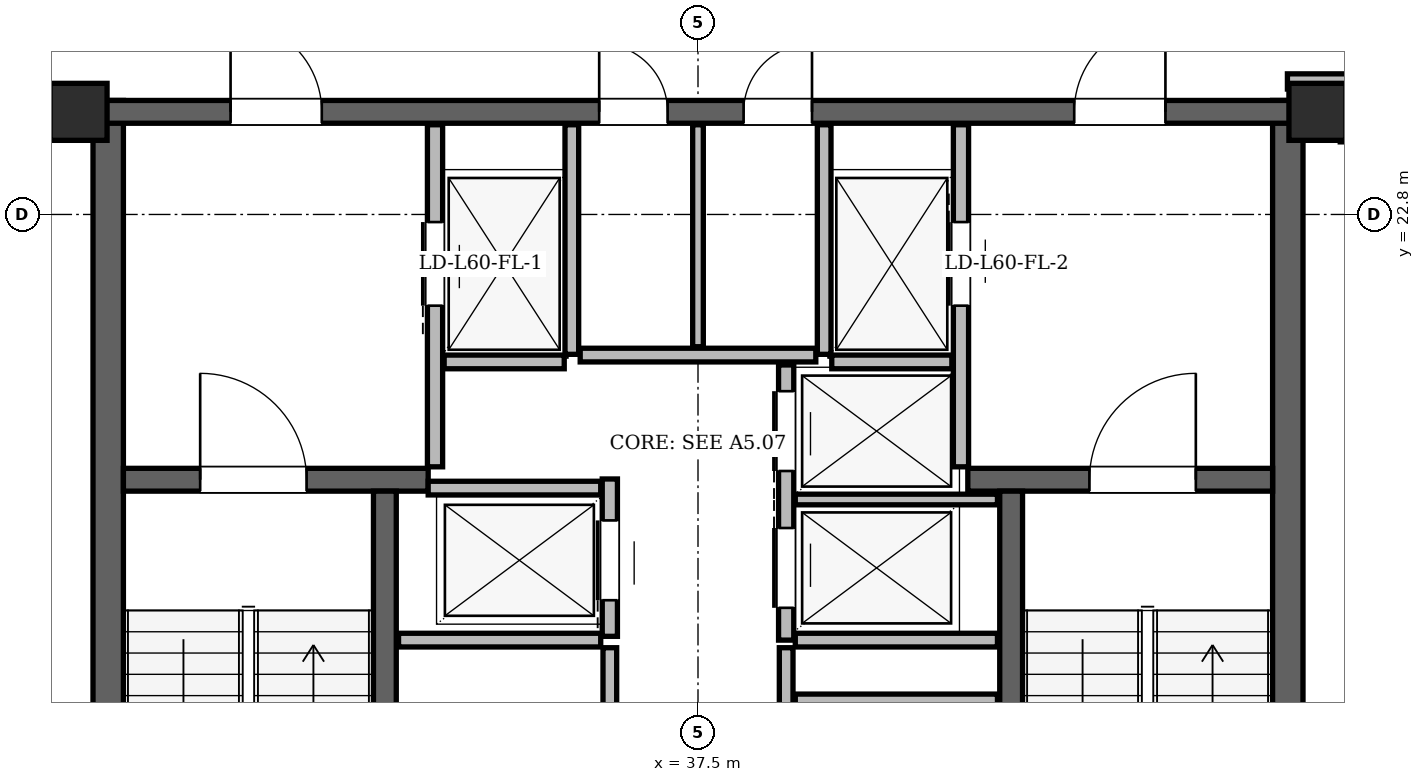
"""IFC4 building model, lengths in metres.
Left out: names, types, materials, properties, quantities, classifications, styles, units other than length and angle.
Written with IfcOpenShell. Run it as: python <this file> out.ifc"""

import sys

from ifc_helpers import new_model, si_unit, direction, frame, frame_2d, origin, origin_2d, place, context, subcontext, project, spatial, rectangle, hollow_rectangle, extrude, element, fill, save


model = new_model("IFC4")
c1 = context("Model", 3, precision=1e-05, world=origin(), true_north=direction((0.0, 1.0)))
c2 = subcontext(c1, "Body", "Model", "MODEL_VIEW")
j1 = project(units=[si_unit("LENGTHUNIT", "METRE"), si_unit("PLANEANGLEUNIT", "RADIAN")], contexts=[c1])
p1 = place(None, origin())
s1 = spatial("IfcSite", under=j1, at=p1, CompositionType="ELEMENT")
p2 = place(p1, origin())
s2 = spatial("IfcBuilding", under=s1, at=p2, CompositionType="ELEMENT")
p3 = place(p2, frame((0.0, 0.0, 227.1)))
s3 = spatial("IfcBuildingStorey", under=s2, at=p3, CompositionType="ELEMENT", Elevation=227.1)
for number, where, z_axis, x_axis in (
    (1, (45.65, 24.15, 0.0), (0.0, 0.0, 1.0), (1.0, 0.0, 0.0)),
    (2, (29.35, 24.15, 0.0), (0.0, 0.0, 1.0), (1.0, 0.0, 0.0)),
):
    element("IfcColumn", number, at=place(p3, frame(where, z_axis=z_axis, x_axis=x_axis)), inside=s3, PredefinedType="COLUMN", context=c2, shape_type="SweptSolid", body=[
        extrude(hollow_rectangle(XDim=0.75, YDim=0.75, WallThickness=0.06, at=origin_2d()), origin(), (0.0, 0.0, 1.0), 3.6),
    ])
for number, where, z_axis, x_axis in (
    (3, (29.74, 11.0, 0.0), (0.0, 0.0, 1.0), (0.0, 1.0, 0.0)),
    (4, (45.26, 11.0, 0.0), (0.0, 0.0, 1.0), (0.0, 1.0, 0.0)),
):
    element("IfcWall", number, at=place(p3, frame(where, z_axis=z_axis, x_axis=x_axis)), inside=s3, PredefinedType="SHEAR", context=c2, shape_type="SweptSolid", body=[
        extrude(rectangle(XDim=13.3, YDim=0.4, at=frame_2d((6.65, 0.0))), origin(), (0.0, 0.0, 1.0), 3.38),
    ])
p4 = place(p3, frame((29.65, 24.15, 0.0), z_axis=(0.0, 0.0, 1.0), x_axis=(1.0, 0.0, 0.0)))
e5 = element("IfcWall", 5, at=p4, inside=s3, PredefinedType="SHEAR", context=c2, shape_type="SweptSolid", body=[
    extrude(rectangle(XDim=15.7, YDim=0.3, at=frame_2d((7.85, 0.0))), origin(), (0.0, 0.0, 1.0), 3.38),
])
p5 = place(p4, frame((1.7, 0.0, 0.0)))
e6 = element("IfcOpeningElement", 6, at=p5, cuts=e5, PredefinedType="OPENING", context=c2, shape_type="SweptSolid", body=[
    extrude(rectangle(XDim=1.2, YDim=2.2, at=frame_2d((0.6, 1.1))), frame((0.0, 0.15, 0.0), z_axis=(0.0, -1.0, 0.0), x_axis=(1.0, 0.0, 0.0)), (0.0, 0.0, 1.0), 0.3),
])
p6 = place(p4, frame((12.8, 0.0, 0.0)))
e7 = element("IfcOpeningElement", 7, at=p6, cuts=e5, PredefinedType="OPENING", context=c2, shape_type="SweptSolid", body=[
    extrude(rectangle(XDim=1.2, YDim=2.2, at=frame_2d((0.6, 1.1))), frame((0.0, 0.15, 0.0), z_axis=(0.0, -1.0, 0.0), x_axis=(1.0, 0.0, 0.0)), (0.0, 0.0, 1.0), 0.3),
])
p7 = place(p4, frame((6.55, 0.0, 0.0)))
e8 = element("IfcOpeningElement", 8, at=p7, cuts=e5, PredefinedType="OPENING", context=c2, shape_type="SweptSolid", body=[
    extrude(rectangle(XDim=0.9, YDim=2.05, at=frame_2d((0.45, 1.025))), frame((0.0, 0.15, 0.0), z_axis=(0.0, -1.0, 0.0), x_axis=(1.0, 0.0, 0.0)), (0.0, 0.0, 1.0), 0.3),
])
p8 = place(p4, frame((8.45, 0.0, 0.0)))
e9 = element("IfcOpeningElement", 9, at=p8, cuts=e5, PredefinedType="OPENING", context=c2, shape_type="SweptSolid", body=[
    extrude(rectangle(XDim=0.9, YDim=2.05, at=frame_2d((0.45, 1.025))), frame((0.0, 0.15, 0.0), z_axis=(0.0, -1.0, 0.0), x_axis=(1.0, 0.0, 0.0)), (0.0, 0.0, 1.0), 0.3),
])
p9 = place(p3, frame((29.94, 19.31, 0.0), z_axis=(0.0, 0.0, 1.0), x_axis=(1.0, 0.0, 0.0)))
e10 = element("IfcWall", 10, at=p9, inside=s3, PredefinedType="SHEAR", context=c2, shape_type="SweptSolid", body=[
    extrude(rectangle(XDim=4.01, YDim=0.3, at=frame_2d((2.005, 0.0))), origin(), (0.0, 0.0, 1.0), 3.38),
])
p10 = place(p9, frame((1.01, 0.0, 0.0)))
e11 = element("IfcOpeningElement", 11, at=p10, cuts=e10, PredefinedType="OPENING", context=c2, shape_type="SweptSolid", body=[
    extrude(rectangle(XDim=1.4, YDim=2.2, at=frame_2d((0.7, 1.1))), frame((0.0, 0.15, 0.0), z_axis=(0.0, -1.0, 0.0), x_axis=(1.0, 0.0, 0.0)), (0.0, 0.0, 1.0), 0.3),
])
p11 = place(p3, frame((41.05, 19.31, 0.0), z_axis=(0.0, 0.0, 1.0), x_axis=(1.0, 0.0, 0.0)))
e12 = element("IfcWall", 12, at=p11, inside=s3, PredefinedType="SHEAR", context=c2, shape_type="SweptSolid", body=[
    extrude(rectangle(XDim=4.01, YDim=0.3, at=frame_2d((2.005, 0.0))), origin(), (0.0, 0.0, 1.0), 3.38),
])
p12 = place(p11, frame((1.6, 0.0, 0.0)))
e13 = element("IfcOpeningElement", 13, at=p12, cuts=e12, PredefinedType="OPENING", context=c2, shape_type="SweptSolid", body=[
    extrude(rectangle(XDim=1.4, YDim=2.2, at=frame_2d((0.7, 1.1))), frame((0.0, 0.15, 0.0), z_axis=(0.0, -1.0, 0.0), x_axis=(1.0, 0.0, 0.0)), (0.0, 0.0, 1.0), 0.3),
])
for number, where, z_axis, x_axis in (
    (14, (33.38, 11.54, 0.0), (0.0, 0.0, 1.0), (0.0, 1.0, 0.0)),
    (15, (41.62, 11.54, 0.0), (0.0, 0.0, 1.0), (0.0, 1.0, 0.0)),
):
    element("IfcWall", number, at=place(p3, frame(where, z_axis=z_axis, x_axis=x_axis)), inside=s3, PredefinedType="SHEAR", context=c2, shape_type="SweptSolid", body=[
        extrude(rectangle(XDim=7.62, YDim=0.3, at=frame_2d((3.81, 0.0))), origin(), (0.0, 0.0, 1.0), 3.38),
    ])
p13 = place(p3, frame((34.344, 43.135, 0.0), z_axis=(0.0, 0.0, 1.0), x_axis=(-0.499998927115, -0.866026023214, 0.0)))
e16 = element("IfcWall", 16, at=p13, inside=s3, PredefinedType="SOLIDWALL", context=c2, shape_type="SweptSolid", body=[
    extrude(rectangle(XDim=36.742, YDim=0.29, at=frame_2d((18.371, 0.0))), origin(), (0.0, 0.0, 1.0), 2.677),
])
p14 = place(p13, frame((8.664, 0.0, 0.0)))
e17 = element("IfcOpeningElement", 17, at=p14, cuts=e16, PredefinedType="OPENING", context=c2, shape_type="SweptSolid", body=[
    extrude(rectangle(XDim=1.5, YDim=2.2, at=frame_2d((0.75, 1.1))), frame((0.0, 0.145, 0.0), z_axis=(0.0, -1.0, 0.0), x_axis=(1.0, 0.0, 0.0)), (0.0, 0.0, 1.0), 0.29),
])
p15 = place(p13, frame((28.452, 0.0, 0.0)))
e18 = element("IfcOpeningElement", 18, at=p15, cuts=e16, PredefinedType="OPENING", context=c2, shape_type="SweptSolid", body=[
    extrude(rectangle(XDim=1.5, YDim=2.2, at=frame_2d((0.75, 1.1))), frame((0.0, 0.145, 0.0), z_axis=(0.0, -1.0, 0.0), x_axis=(1.0, 0.0, 0.0)), (0.0, 0.0, 1.0), 0.29),
])
p16 = place(p13, frame((22.282, 0.0, 0.85)))
e19 = element("IfcOpeningElement", 19, at=p16, cuts=e16, PredefinedType="OPENING", context=c2, shape_type="SweptSolid", body=[
    extrude(rectangle(XDim=2.4, YDim=1.717, at=frame_2d((1.2, 0.858))), frame((0.0, 0.145, 0.0), z_axis=(0.0, -1.0, 0.0), x_axis=(1.0, 0.0, 0.0)), (0.0, 0.0, 1.0), 0.29),
])
p17 = place(p13, frame((33.369, 0.0, 0.85)))
e20 = element("IfcOpeningElement", 20, at=p17, cuts=e16, PredefinedType="OPENING", context=c2, shape_type="SweptSolid", body=[
    extrude(rectangle(XDim=2.2, YDim=1.717, at=frame_2d((1.1, 0.858))), frame((0.0, 0.145, 0.0), z_axis=(0.0, -1.0, 0.0), x_axis=(1.0, 0.0, 0.0)), (0.0, 0.0, 1.0), 0.29),
])
p18 = place(p13, frame((11.999, 0.0, 0.85)))
e21 = element("IfcOpeningElement", 21, at=p18, cuts=e16, PredefinedType="OPENING", context=c2, shape_type="SweptSolid", body=[
    extrude(rectangle(XDim=2.4, YDim=1.717, at=frame_2d((1.2, 0.858))), frame((0.0, 0.145, 0.0), z_axis=(0.0, -1.0, 0.0), x_axis=(1.0, 0.0, 0.0)), (0.0, 0.0, 1.0), 0.29),
])
p19 = place(p13, frame((16.783, 0.0, 0.85)))
e22 = element("IfcOpeningElement", 22, at=p19, cuts=e16, PredefinedType="OPENING", context=c2, shape_type="SweptSolid", body=[
    extrude(rectangle(XDim=1.8, YDim=1.717, at=frame_2d((0.9, 0.858))), frame((0.0, 0.145, 0.0), z_axis=(0.0, -1.0, 0.0), x_axis=(1.0, 0.0, 0.0)), (0.0, 0.0, 1.0), 0.29),
])
p20 = place(p13, frame((3.365, 0.0, 0.85)))
e23 = element("IfcOpeningElement", 23, at=p20, cuts=e16, PredefinedType="OPENING", context=c2, shape_type="SweptSolid", body=[
    extrude(rectangle(XDim=1.2, YDim=1.48, at=frame_2d((0.6, 0.74))), frame((0.0, 0.145, 0.0), z_axis=(0.0, -1.0, 0.0), x_axis=(1.0, 0.0, 0.0)), (0.0, 0.0, 1.0), 0.29),
])
p21 = place(p13, frame((6.797, 0.0, 0.85)))
e24 = element("IfcOpeningElement", 24, at=p21, cuts=e16, PredefinedType="OPENING", context=c2, shape_type="SweptSolid", body=[
    extrude(rectangle(XDim=1.2, YDim=1.48, at=frame_2d((0.6, 0.74))), frame((0.0, 0.145, 0.0), z_axis=(0.0, -1.0, 0.0), x_axis=(1.0, 0.0, 0.0)), (0.0, 0.0, 1.0), 0.29),
])
p22 = place(p3, frame((34.04, 19.48, 0.0), z_axis=(0.0, 0.0, 1.0), x_axis=(0.0, 1.0, 0.0)))
e25 = element("IfcWall", 25, at=p22, inside=s3, PredefinedType="PARTITIONING", context=c2, shape_type="SweptSolid", body=[
    extrude(rectangle(XDim=4.5, YDim=0.2, at=frame_2d((2.25, 0.0))), origin(), (0.0, 0.0, 1.0), 3.38),
])
p23 = place(p22, frame((2.12, 0.0, 0.0)))
e26 = element("IfcOpeningElement", 26, at=p23, cuts=e25, PredefinedType="OPENING", context=c2, shape_type="SweptSolid", body=[
    extrude(rectangle(XDim=1.1, YDim=2.2, at=frame_2d((0.55, 1.1))), frame((0.0, 0.1, 0.0), z_axis=(0.0, -1.0, 0.0), x_axis=(1.0, 0.0, 0.0)), (0.0, 0.0, 1.0), 0.2),
])
p24 = place(p3, frame((35.84, 20.96, 0.0), z_axis=(0.0, 0.0, 1.0), x_axis=(0.0, 1.0, 0.0)))
e27 = element("IfcWall", 27, at=p24, inside=s3, PredefinedType="PARTITIONING", context=c2, shape_type="SweptSolid", body=[
    extrude(rectangle(XDim=3.02, YDim=0.18, at=frame_2d((1.51, 0.0))), origin(), (0.0, 0.0, 1.0), 3.38),
])
p25 = place(p3, frame((34.16, 20.86, 0.0), z_axis=(0.0, 0.0, 1.0), x_axis=(1.0, 0.0, 0.0)))
e28 = element("IfcWall", 28, at=p25, inside=s3, PredefinedType="PARTITIONING", context=c2, shape_type="SweptSolid", body=[
    extrude(rectangle(XDim=1.58, YDim=0.18, at=frame_2d((0.79, 0.0))), origin(), (0.0, 0.0, 1.0), 3.38),
])
p26 = place(p3, frame((40.96, 19.48, 0.0), z_axis=(0.0, 0.0, 1.0), x_axis=(0.0, 1.0, 0.0)))
e29 = element("IfcWall", 29, at=p26, inside=s3, PredefinedType="PARTITIONING", context=c2, shape_type="SweptSolid", body=[
    extrude(rectangle(XDim=4.5, YDim=0.2, at=frame_2d((2.25, 0.0))), origin(), (0.0, 0.0, 1.0), 3.38),
])
p27 = place(p26, frame((2.12, 0.0, 0.0)))
e30 = element("IfcOpeningElement", 30, at=p27, cuts=e29, PredefinedType="OPENING", context=c2, shape_type="SweptSolid", body=[
    extrude(rectangle(XDim=1.1, YDim=2.2, at=frame_2d((0.55, 1.1))), frame((0.0, 0.1, 0.0), z_axis=(0.0, -1.0, 0.0), x_axis=(1.0, 0.0, 0.0)), (0.0, 0.0, 1.0), 0.2),
])
p28 = place(p3, frame((39.16, 20.96, 0.0), z_axis=(0.0, 0.0, 1.0), x_axis=(0.0, 1.0, 0.0)))
e31 = element("IfcWall", 31, at=p28, inside=s3, PredefinedType="PARTITIONING", context=c2, shape_type="SweptSolid", body=[
    extrude(rectangle(XDim=3.02, YDim=0.18, at=frame_2d((1.51, 0.0))), origin(), (0.0, 0.0, 1.0), 3.38),
])
p29 = place(p3, frame((39.26, 20.86, 0.0), z_axis=(0.0, 0.0, 1.0), x_axis=(1.0, 0.0, 0.0)))
e32 = element("IfcWall", 32, at=p29, inside=s3, PredefinedType="PARTITIONING", context=c2, shape_type="SweptSolid", body=[
    extrude(rectangle(XDim=1.58, YDim=0.18, at=frame_2d((0.79, 0.0))), origin(), (0.0, 0.0, 1.0), 3.38),
])
p30 = place(p3, frame((36.34, 17.25, 0.0), z_axis=(0.0, 0.0, 1.0), x_axis=(0.0, 1.0, 0.0)))
e33 = element("IfcWall", 33, at=p30, inside=s3, PredefinedType="PARTITIONING", context=c2, shape_type="SweptSolid", body=[
    extrude(rectangle(XDim=2.07, YDim=0.2, at=frame_2d((1.035, 0.0))), origin(), (0.0, 0.0, 1.0), 3.38),
])
p31 = place(p30, frame((0.475, 0.0, 0.0)))
e34 = element("IfcOpeningElement", 34, at=p31, cuts=e33, PredefinedType="OPENING", context=c2, shape_type="SweptSolid", body=[
    extrude(rectangle(XDim=1.05, YDim=2.15, at=frame_2d((0.525, 1.075))), frame((0.0, 0.1, 0.0), z_axis=(0.0, -1.0, 0.0), x_axis=(1.0, 0.0, 0.0)), (0.0, 0.0, 1.0), 0.2),
])
p32 = place(p3, frame((33.95, 19.2, 0.0), z_axis=(0.0, 0.0, 1.0), x_axis=(1.0, 0.0, 0.0)))
e35 = element("IfcWall", 35, at=p32, inside=s3, PredefinedType="PARTITIONING", context=c2, shape_type="SweptSolid", body=[
    extrude(rectangle(XDim=2.27, YDim=0.18, at=frame_2d((1.135, 0.0))), origin(), (0.0, 0.0, 1.0), 3.38),
])
p33 = place(p3, frame((33.56, 17.2, 0.0), z_axis=(0.0, 0.0, 1.0), x_axis=(1.0, 0.0, 0.0)))
e36 = element("IfcWall", 36, at=p33, inside=s3, PredefinedType="PARTITIONING", context=c2, shape_type="SweptSolid", body=[
    extrude(rectangle(XDim=2.66, YDim=0.18, at=frame_2d((1.33, 0.0))), origin(), (0.0, 0.0, 1.0), 3.38),
])
p34 = place(p3, frame((36.34, 11.55, 0.0), z_axis=(0.0, 0.0, 1.0), x_axis=(0.0, 1.0, 0.0)))
e37 = element("IfcWall", 37, at=p34, inside=s3, PredefinedType="PARTITIONING", context=c2, shape_type="SweptSolid", body=[
    extrude(rectangle(XDim=5.55, YDim=0.18, at=frame_2d((2.775, 0.0))), origin(), (0.0, 0.0, 1.0), 3.38),
])
p35 = place(p34, frame((2.85, 0.0, 0.0)))
e38 = element("IfcOpeningElement", 38, at=p35, cuts=e37, PredefinedType="OPENING", context=c2, shape_type="SweptSolid", body=[
    extrude(rectangle(XDim=0.95, YDim=2.1, at=frame_2d((0.475, 1.05))), frame((0.0, 0.09, 0.0), z_axis=(0.0, -1.0, 0.0), x_axis=(1.0, 0.0, 0.0)), (0.0, 0.0, 1.0), 0.18),
])
p36 = place(p3, frame((38.66, 17.2, 0.0), z_axis=(0.0, 0.0, 1.0), x_axis=(0.0, 1.0, 0.0)))
e39 = element("IfcWall", 39, at=p36, inside=s3, PredefinedType="PARTITIONING", context=c2, shape_type="SweptSolid", body=[
    extrude(rectangle(XDim=3.62, YDim=0.2, at=frame_2d((1.81, 0.0))), origin(), (0.0, 0.0, 1.0), 3.38),
])
p37 = place(p36, frame((0.425, 0.0, 0.0)))
e40 = element("IfcOpeningElement", 40, at=p37, cuts=e39, PredefinedType="OPENING", context=c2, shape_type="SweptSolid", body=[
    extrude(rectangle(XDim=1.05, YDim=2.15, at=frame_2d((0.525, 1.075))), frame((0.0, 0.1, 0.0), z_axis=(0.0, -1.0, 0.0), x_axis=(1.0, 0.0, 0.0)), (0.0, 0.0, 1.0), 0.2),
])
p38 = place(p36, frame((2.225, 0.0, 0.0)))
e41 = element("IfcOpeningElement", 41, at=p38, cuts=e39, PredefinedType="OPENING", context=c2, shape_type="SweptSolid", body=[
    extrude(rectangle(XDim=1.05, YDim=2.15, at=frame_2d((0.525, 1.075))), frame((0.0, 0.1, 0.0), z_axis=(0.0, -1.0, 0.0), x_axis=(1.0, 0.0, 0.0)), (0.0, 0.0, 1.0), 0.2),
])
p39 = place(p3, frame((38.78, 17.2, 0.0), z_axis=(0.0, 0.0, 1.0), x_axis=(1.0, 0.0, 0.0)))
e42 = element("IfcWall", 42, at=p39, inside=s3, PredefinedType="PARTITIONING", context=c2, shape_type="SweptSolid", body=[
    extrude(rectangle(XDim=2.66, YDim=0.18, at=frame_2d((1.33, 0.0))), origin(), (0.0, 0.0, 1.0), 3.38),
])
p40 = place(p3, frame((38.78, 19.05, 0.0), z_axis=(0.0, 0.0, 1.0), x_axis=(1.0, 0.0, 0.0)))
e43 = element("IfcWall", 43, at=p40, inside=s3, PredefinedType="PARTITIONING", context=c2, shape_type="SweptSolid", body=[
    extrude(rectangle(XDim=2.66, YDim=0.14, at=frame_2d((1.33, 0.0))), origin(), (0.0, 0.0, 1.0), 3.38),
])
p41 = place(p3, frame((38.66, 11.55, 0.0), z_axis=(0.0, 0.0, 1.0), x_axis=(0.0, 1.0, 0.0)))
e44 = element("IfcWall", 44, at=p41, inside=s3, PredefinedType="PARTITIONING", context=c2, shape_type="SweptSolid", body=[
    extrude(rectangle(XDim=5.55, YDim=0.18, at=frame_2d((2.775, 0.0))), origin(), (0.0, 0.0, 1.0), 3.38),
])
p42 = place(p41, frame((2.0, 0.0, 0.0)))
e45 = element("IfcOpeningElement", 45, at=p42, cuts=e44, PredefinedType="OPENING", context=c2, shape_type="SweptSolid", body=[
    extrude(rectangle(XDim=0.95, YDim=2.1, at=frame_2d((0.475, 1.05))), frame((0.0, 0.09, 0.0), z_axis=(0.0, -1.0, 0.0), x_axis=(1.0, 0.0, 0.0)), (0.0, 0.0, 1.0), 0.18),
])
p43 = place(p3, frame((38.78, 16.42, 0.0), z_axis=(0.0, 0.0, 1.0), x_axis=(1.0, 0.0, 0.0)))
e46 = element("IfcWall", 46, at=p43, inside=s3, PredefinedType="PARTITIONING", context=c2, shape_type="SweptSolid", body=[
    extrude(rectangle(XDim=2.66, YDim=0.14, at=frame_2d((1.33, 0.0))), origin(), (0.0, 0.0, 1.0), 3.38),
])
p44 = place(p3, frame((35.95, 20.95, 0.0), z_axis=(0.0, 0.0, 1.0), x_axis=(1.0, 0.0, 0.0)))
e47 = element("IfcWall", 47, at=p44, inside=s3, PredefinedType="PARTITIONING", context=c2, shape_type="SweptSolid", body=[
    extrude(rectangle(XDim=3.1, YDim=0.18, at=frame_2d((1.55, 0.0))), origin(), (0.0, 0.0, 1.0), 3.38),
])
p45 = place(p3, frame((37.5, 21.06, 0.0), z_axis=(0.0, 0.0, 1.0), x_axis=(0.0, 1.0, 0.0)))
e48 = element("IfcWall", 48, at=p45, inside=s3, PredefinedType="PARTITIONING", context=c2, shape_type="SweptSolid", body=[
    extrude(rectangle(XDim=2.92, YDim=0.14, at=frame_2d((1.46, 0.0))), origin(), (0.0, 0.0, 1.0), 3.38),
])
p46 = place(p3, frame((45.255, 24.55, 0.0), z_axis=(0.0, 0.0, 1.0), x_axis=(1.0, 0.0, 0.0)))
e49 = element("IfcWall", 49, at=p46, inside=s3, PredefinedType="PARTITIONING", context=c2, shape_type="SweptSolid", body=[
    extrude(rectangle(XDim=0.79, YDim=0.2, at=frame_2d((0.395, 0.0))), origin(), (0.0, 0.0, 1.0), 2.913),
])
p47 = place(p3, frame((46.05, 23.755, 0.0), z_axis=(0.0, 0.0, 1.0), x_axis=(0.0, 1.0, 0.0)))
e50 = element("IfcWall", 50, at=p47, inside=s3, PredefinedType="PARTITIONING", context=c2, shape_type="SweptSolid", body=[
    extrude(rectangle(XDim=0.565, YDim=0.2, at=frame_2d((0.283, 0.0))), origin(), (0.0, 0.0, 1.0), 3.38),
])
p48 = place(p23, origin())
e51 = element("IfcDoor", 51, at=p48, inside=s3, OperationType="SLIDING_TO_LEFT", PredefinedType="DOOR", context=c2, shape_type="SweptSolid", body=[
    extrude(rectangle(XDim=1.1, YDim=2.2, at=frame_2d((0.55, 1.1))), frame((0.0, 0.025, 0.0), z_axis=(0.0, -1.0, 0.0), x_axis=(1.0, 0.0, 0.0)), (0.0, 0.0, 1.0), 0.05),
])
fill(e26, e51)
p49 = place(p27, origin())
e52 = element("IfcDoor", 52, at=p49, inside=s3, OperationType="SLIDING_TO_RIGHT", PredefinedType="DOOR", context=c2, shape_type="SweptSolid", body=[
    extrude(rectangle(XDim=1.1, YDim=2.2, at=frame_2d((0.55, 1.1))), frame((0.0, 0.025, 0.0), z_axis=(0.0, -1.0, 0.0), x_axis=(1.0, 0.0, 0.0)), (0.0, 0.0, 1.0), 0.05),
])
fill(e30, e52)
p50 = place(p31, origin())
e53 = element("IfcDoor", 53, at=p50, inside=s3, OperationType="SLIDING_TO_LEFT", PredefinedType="DOOR", context=c2, shape_type="SweptSolid", body=[
    extrude(rectangle(XDim=1.05, YDim=2.15, at=frame_2d((0.525, 1.075))), frame((0.0, 0.025, 0.0), z_axis=(0.0, -1.0, 0.0), x_axis=(1.0, 0.0, 0.0)), (0.0, 0.0, 1.0), 0.05),
])
fill(e34, e53)
p51 = place(p37, origin())
e54 = element("IfcDoor", 54, at=p51, inside=s3, OperationType="SLIDING_TO_RIGHT", PredefinedType="DOOR", context=c2, shape_type="SweptSolid", body=[
    extrude(rectangle(XDim=1.05, YDim=2.15, at=frame_2d((0.525, 1.075))), frame((0.0, 0.025, 0.0), z_axis=(0.0, -1.0, 0.0), x_axis=(1.0, 0.0, 0.0)), (0.0, 0.0, 1.0), 0.05),
])
fill(e40, e54)
p52 = place(p38, origin())
e55 = element("IfcDoor", 55, at=p52, inside=s3, OperationType="SLIDING_TO_LEFT", PredefinedType="DOOR", context=c2, shape_type="SweptSolid", body=[
    extrude(rectangle(XDim=1.05, YDim=2.15, at=frame_2d((0.525, 1.075))), frame((0.0, 0.025, 0.0), z_axis=(0.0, -1.0, 0.0), x_axis=(1.0, 0.0, 0.0)), (0.0, 0.0, 1.0), 0.05),
])
fill(e41, e55)
p53 = place(p10, origin())
e56 = element("IfcDoor", 56, at=p53, inside=s3, OperationType="SINGLE_SWING_LEFT", PredefinedType="DOOR", context=c2, shape_type="SweptSolid", body=[
    extrude(rectangle(XDim=1.4, YDim=2.2, at=frame_2d((0.7, 1.1))), frame((0.0, 0.025, 0.0), z_axis=(0.0, -1.0, 0.0), x_axis=(1.0, 0.0, 0.0)), (0.0, 0.0, 1.0), 0.05),
])
fill(e11, e56)
p54 = place(p12, origin())
e57 = element("IfcDoor", 57, at=p54, inside=s3, OperationType="SINGLE_SWING_RIGHT", PredefinedType="DOOR", context=c2, shape_type="SweptSolid", body=[
    extrude(rectangle(XDim=1.4, YDim=2.2, at=frame_2d((0.7, 1.1))), frame((0.0, 0.025, 0.0), z_axis=(0.0, -1.0, 0.0), x_axis=(1.0, 0.0, 0.0)), (0.0, 0.0, 1.0), 0.05),
])
fill(e13, e57)
p55 = place(p5, origin())
e58 = element("IfcDoor", 58, at=p55, inside=s3, OperationType="SINGLE_SWING_LEFT", PredefinedType="DOOR", context=c2, shape_type="SweptSolid", body=[
    extrude(rectangle(XDim=1.2, YDim=2.2, at=frame_2d((0.6, 1.1))), frame((0.0, 0.025, 0.0), z_axis=(0.0, -1.0, 0.0), x_axis=(1.0, 0.0, 0.0)), (0.0, 0.0, 1.0), 0.05),
])
fill(e6, e58)
p56 = place(p6, origin())
e59 = element("IfcDoor", 59, at=p56, inside=s3, OperationType="SINGLE_SWING_RIGHT", PredefinedType="DOOR", context=c2, shape_type="SweptSolid", body=[
    extrude(rectangle(XDim=1.2, YDim=2.2, at=frame_2d((0.6, 1.1))), frame((0.0, 0.025, 0.0), z_axis=(0.0, -1.0, 0.0), x_axis=(1.0, 0.0, 0.0)), (0.0, 0.0, 1.0), 0.05),
])
fill(e7, e59)
p57 = place(p7, origin())
e60 = element("IfcDoor", 60, at=p57, inside=s3, OperationType="SINGLE_SWING_LEFT", PredefinedType="DOOR", context=c2, shape_type="SweptSolid", body=[
    extrude(rectangle(XDim=0.9, YDim=2.05, at=frame_2d((0.45, 1.025))), frame((0.0, 0.025, 0.0), z_axis=(0.0, -1.0, 0.0), x_axis=(1.0, 0.0, 0.0)), (0.0, 0.0, 1.0), 0.05),
])
fill(e8, e60)
p58 = place(p8, origin())
e61 = element("IfcDoor", 61, at=p58, inside=s3, OperationType="SINGLE_SWING_RIGHT", PredefinedType="DOOR", context=c2, shape_type="SweptSolid", body=[
    extrude(rectangle(XDim=0.9, YDim=2.05, at=frame_2d((0.45, 1.025))), frame((0.0, 0.025, 0.0), z_axis=(0.0, -1.0, 0.0), x_axis=(1.0, 0.0, 0.0)), (0.0, 0.0, 1.0), 0.05),
])
fill(e9, e61)
save(model, sys.argv[1])
